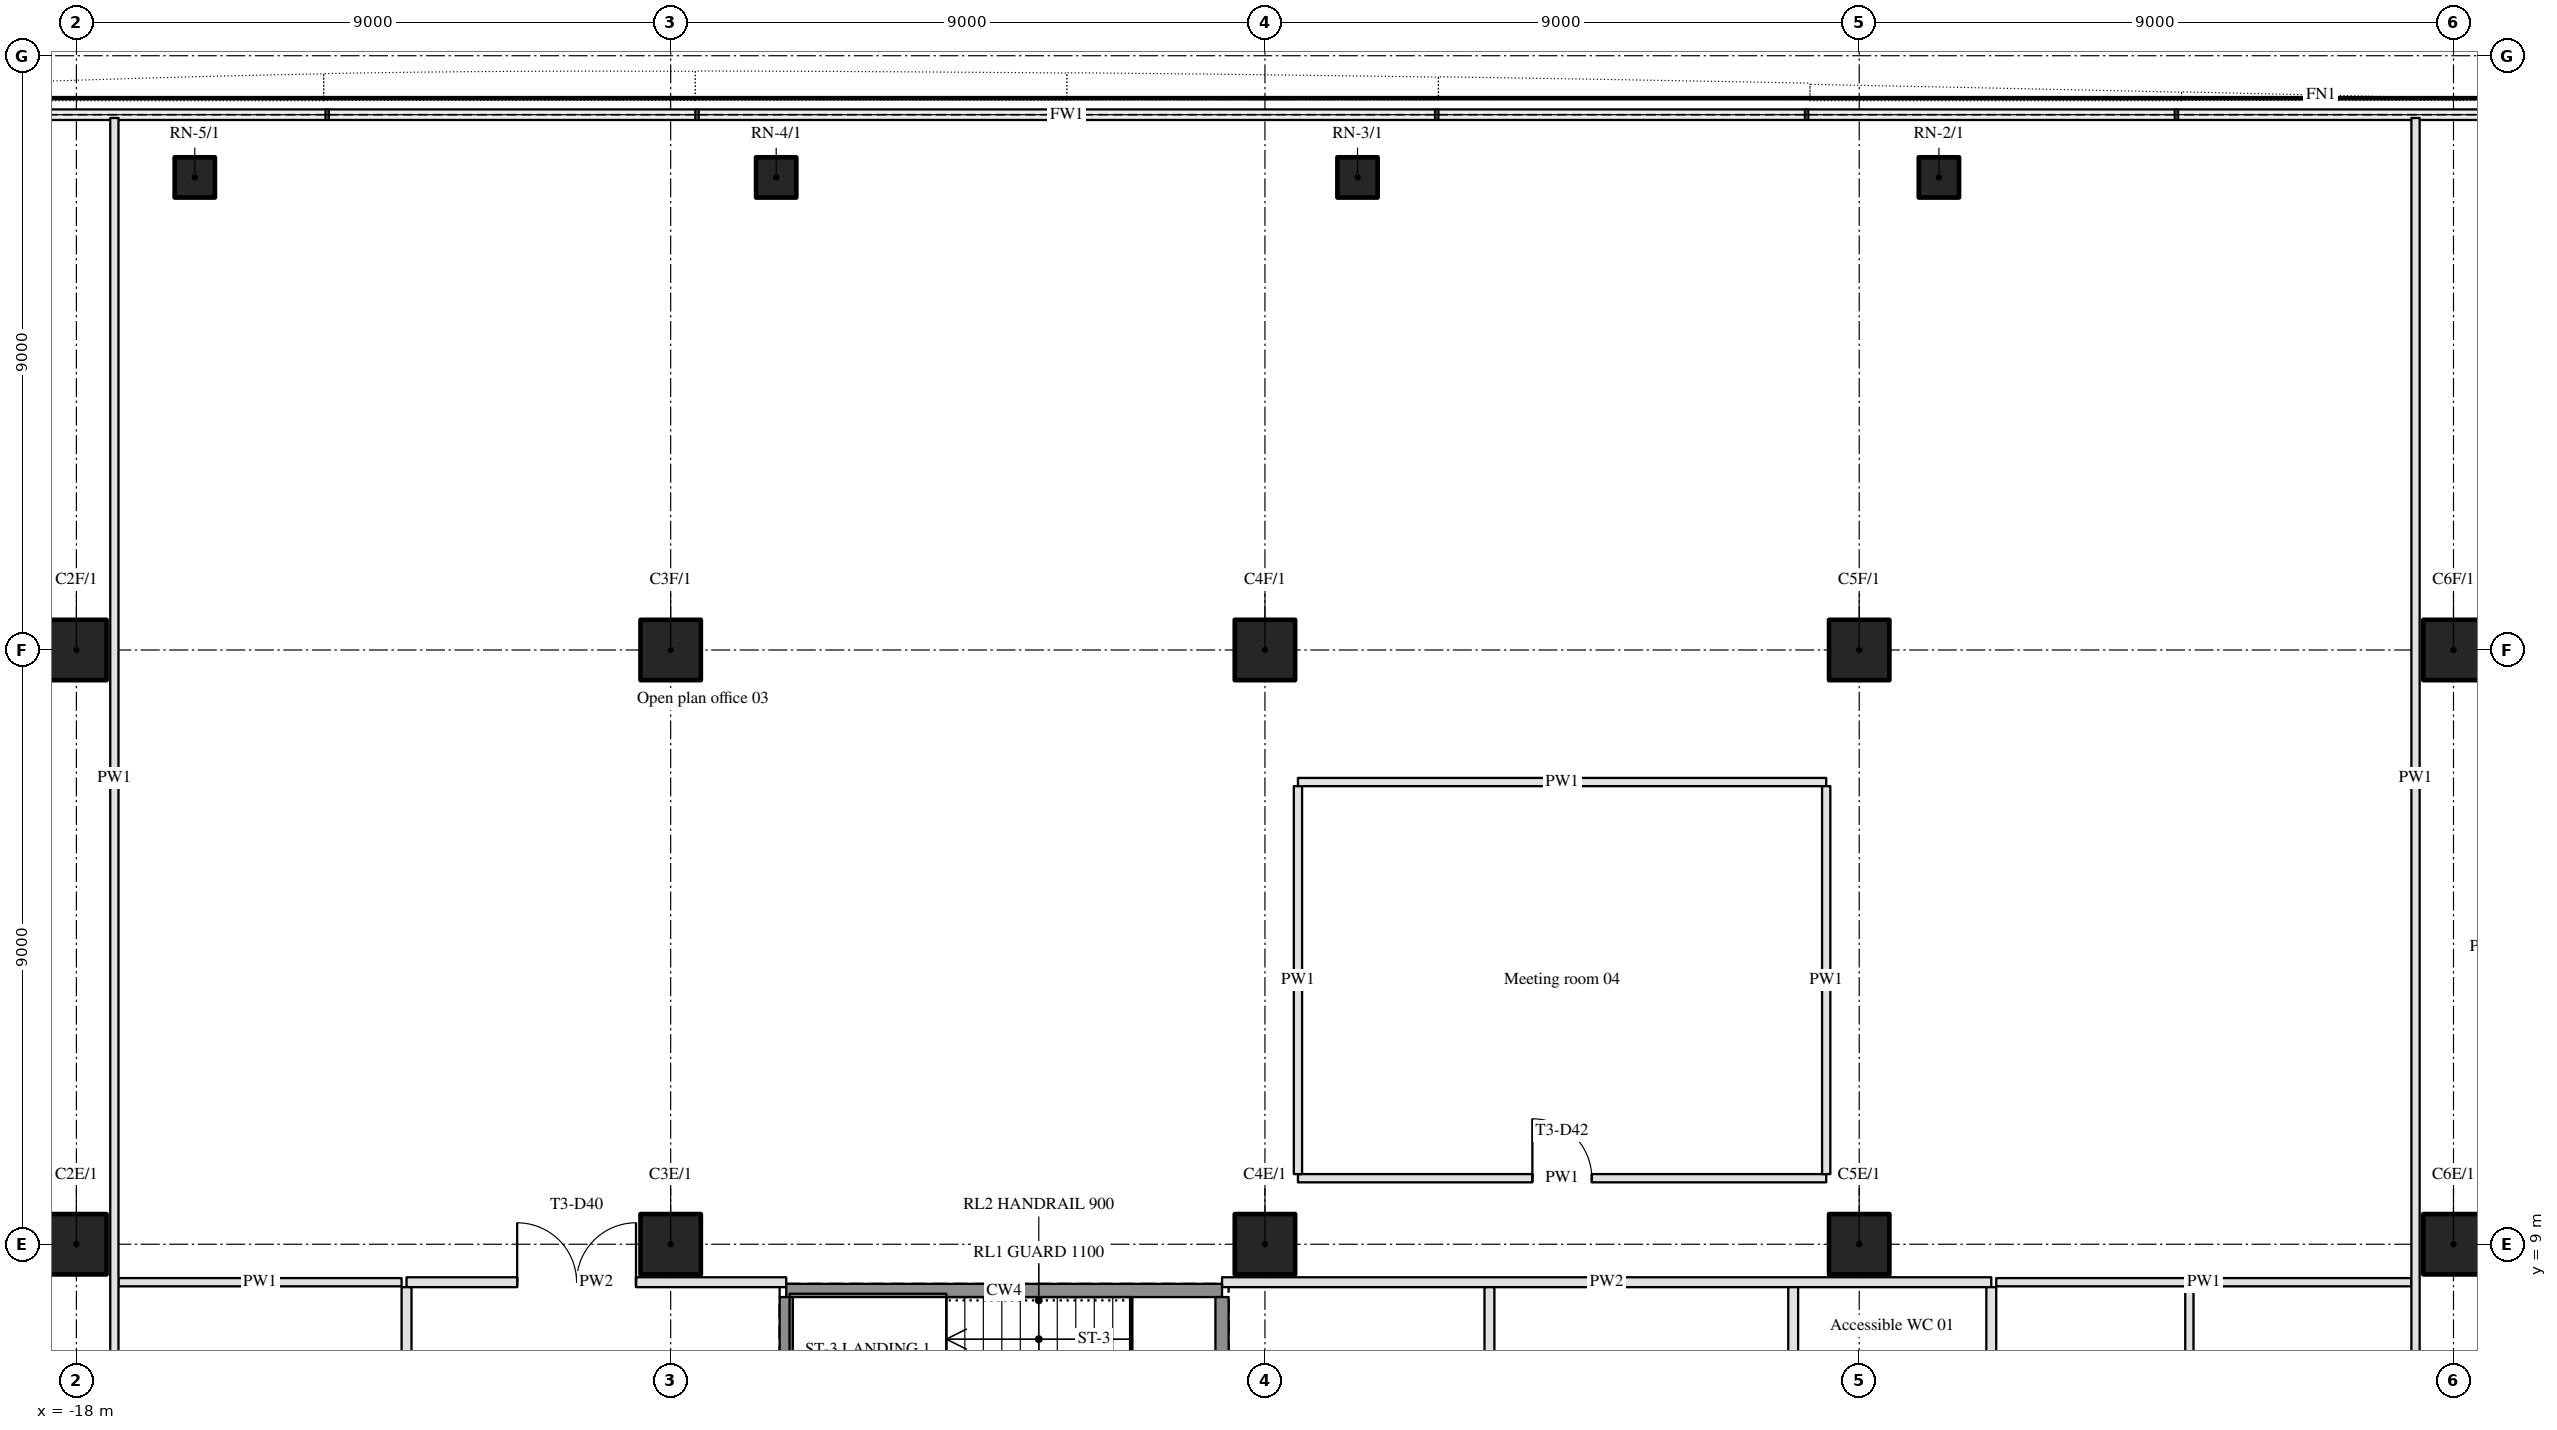
"""IFC4 building model, lengths in metres.
Left out: names, types, materials, properties, quantities, classifications, styles, units other than length and angle.
Written with IfcOpenShell. Run it as: python <this file> out.ifc"""

import sys

from ifc_helpers import new_model, si_unit, direction, frame, frame_2d, origin, origin_2d, place, context, subcontext, project, spatial, rectangle, hollow_circle, extrude, element, fill, save


model = new_model("IFC4")
c1 = context("Model", 3, precision=1e-05, world=origin(), true_north=direction((0.0, 1.0)))
c2 = subcontext(c1, "Body", "Model", "MODEL_VIEW")
j1 = project(units=[si_unit("LENGTHUNIT", "METRE"), si_unit("PLANEANGLEUNIT", "RADIAN")], contexts=[c1])
p1 = place(None, origin())
s1 = spatial("IfcSite", under=j1, at=p1, CompositionType="ELEMENT")
p2 = place(p1, origin())
s2 = spatial("IfcBuilding", under=s1, at=p2, CompositionType="ELEMENT")
p3 = place(p2, frame((0.0, 0.0, 53.7)))
s3 = spatial("IfcBuildingStorey", under=s2, at=p3, CompositionType="ELEMENT", Elevation=53.7)
for number, where, z_axis, x_axis in (
    (1, (-18.0, 9.0, 0.0), (0.0, 0.0, 1.0), (1.0, 0.0, 0.0)),
    (2, (-18.0, 18.0, 0.0), (0.0, 0.0, 1.0), (1.0, 0.0, 0.0)),
    (3, (-9.0, 9.0, 0.0), (0.0, 0.0, 1.0), (1.0, 0.0, 0.0)),
    (4, (-9.0, 18.0, 0.0), (0.0, 0.0, 1.0), (1.0, 0.0, 0.0)),
    (5, (0.0, 9.0, 0.0), (0.0, 0.0, 1.0), (1.0, 0.0, 0.0)),
    (6, (0.0, 18.0, 0.0), (0.0, 0.0, 1.0), (1.0, 0.0, 0.0)),
    (7, (9.0, 9.0, 0.0), (0.0, 0.0, 1.0), (1.0, 0.0, 0.0)),
    (8, (9.0, 18.0, 0.0), (0.0, 0.0, 1.0), (1.0, 0.0, 0.0)),
    (9, (18.0, 9.0, 0.0), (0.0, 0.0, 1.0), (1.0, 0.0, 0.0)),
    (10, (18.0, 18.0, 0.0), (0.0, 0.0, 1.0), (1.0, 0.0, 0.0)),
):
    element("IfcColumn", number, at=place(p3, frame(where, z_axis=z_axis, x_axis=x_axis)), inside=s3, PredefinedType="COLUMN", context=c2, shape_type="SweptSolid", body=[
        extrude(hollow_circle(Radius=0.457, WallThickness=0.05, at=origin_2d()), origin(), (0.0, 0.0, 1.0), 3.9),
    ])
for number, where, z_axis, x_axis in (
    (11, (10.207, 25.157, 0.0), (0.0, 0.0, 1.0), (1.0, 0.0, 0.0)),
    (12, (1.402, 25.157, 0.0), (0.0, 0.0, 1.0), (1.0, 0.0, 0.0)),
    (13, (-7.402, 25.157, 0.0), (0.0, 0.0, 1.0), (1.0, 0.0, 0.0)),
    (14, (-16.207, 25.157, 0.0), (0.0, 0.0, 1.0), (1.0, 0.0, 0.0)),
):
    element("IfcColumn", number, at=place(p3, frame(where, z_axis=z_axis, x_axis=x_axis)), inside=s3, PredefinedType="COLUMN", context=c2, shape_type="SweptSolid", body=[
        extrude(hollow_circle(Radius=0.305, WallThickness=0.03, at=origin_2d()), origin(), (0.0, 0.0, 1.0), 3.9),
    ])
p4 = place(p3, frame((-7.25, 8.3, 0.0), z_axis=(0.0, 0.0, 1.0), x_axis=(1.0, 0.0, 0.0)))
e15 = element("IfcWall", 15, at=p4, inside=s3, PredefinedType="SHEAR", context=c2, shape_type="SweptSolid", body=[
    extrude(rectangle(XDim=6.6, YDim=0.2, at=frame_2d((3.3, 0.0))), origin(), (0.0, 0.0, 1.0), 3.9),
])
p5 = place(p3, frame((-17.363, 8.425, 0.0), z_axis=(0.0, 0.0, 1.0), x_axis=(1.0, 0.0, 0.0)))
e16 = element("IfcWall", 16, at=p5, inside=s3, PredefinedType="PARTITIONING", context=c2, shape_type="SweptSolid", body=[
    extrude(rectangle(XDim=4.288, YDim=0.125, at=frame_2d((2.144, 0.0))), origin(), (0.0, 0.0, 1.0), 2.96),
])
p6 = place(p3, frame((-13.0, 8.425, 0.0), z_axis=(0.0, 0.0, 1.0), x_axis=(1.0, 0.0, 0.0)))
e17 = element("IfcWall", 17, at=p6, inside=s3, PredefinedType="PARTITIONING", context=c2, shape_type="SweptSolid", body=[
    extrude(rectangle(XDim=5.75, YDim=0.15, at=frame_2d((2.875, 0.0))), origin(), (0.0, 0.0, 1.0), 2.96),
])
p7 = place(p6, frame((1.675, 0.0, 0.0)))
e18 = element("IfcOpeningElement", 18, at=p7, cuts=e17, PredefinedType="OPENING", context=c2, shape_type="SweptSolid", body=[
    extrude(rectangle(XDim=1.8, YDim=2.1, at=frame_2d((0.9, 1.05))), frame((0.0, 0.085, 0.0), z_axis=(0.0, -1.0, 0.0), x_axis=(1.0, 0.0, 0.0)), (0.0, 0.0, 1.0), 0.17),
])
p8 = place(p3, frame((-0.65, 8.425, 0.0), z_axis=(0.0, 0.0, 1.0), x_axis=(1.0, 0.0, 0.0)))
e19 = element("IfcWall", 19, at=p8, inside=s3, PredefinedType="PARTITIONING", context=c2, shape_type="SweptSolid", body=[
    extrude(rectangle(XDim=11.65, YDim=0.15, at=frame_2d((5.825, 0.0))), origin(), (0.0, 0.0, 1.0), 2.96),
])
p9 = place(p3, frame((11.075, 8.425, 0.0), z_axis=(0.0, 0.0, 1.0), x_axis=(1.0, 0.0, 0.0)))
e20 = element("IfcWall", 20, at=p9, inside=s3, PredefinedType="PARTITIONING", context=c2, shape_type="SweptSolid", body=[
    extrude(rectangle(XDim=6.288, YDim=0.125, at=frame_2d((3.144, 0.0))), origin(), (0.0, 0.0, 1.0), 2.96),
])
p10 = place(p3, frame((0.5, 10.0, 0.0), z_axis=(0.0, 0.0, 1.0), x_axis=(1.0, 0.0, 0.0)))
e21 = element("IfcWall", 21, at=p10, inside=s3, PredefinedType="PARTITIONING", context=c2, shape_type="SweptSolid", body=[
    extrude(rectangle(XDim=8.0, YDim=0.125, at=frame_2d((4.0, 0.0))), origin(), (0.0, 0.0, 1.0), 2.96),
])
p11 = place(p10, frame((3.55, 0.0, 0.0)))
e22 = element("IfcOpeningElement", 22, at=p11, cuts=e21, PredefinedType="OPENING", context=c2, shape_type="SweptSolid", body=[
    extrude(rectangle(XDim=0.9, YDim=2.1, at=frame_2d((0.45, 1.05))), frame((0.0, 0.073, 0.0), z_axis=(0.0, -1.0, 0.0), x_axis=(1.0, 0.0, 0.0)), (0.0, 0.0, 1.0), 0.145),
])
p12 = place(p3, frame((0.5, 16.0, 0.0), z_axis=(0.0, 0.0, 1.0), x_axis=(1.0, 0.0, 0.0)))
e23 = element("IfcWall", 23, at=p12, inside=s3, PredefinedType="PARTITIONING", context=c2, shape_type="SweptSolid", body=[
    extrude(rectangle(XDim=8.0, YDim=0.125, at=frame_2d((4.0, 0.0))), origin(), (0.0, 0.0, 1.0), 2.96),
])
p13 = place(p3, frame((-17.425, 6.075, 0.0), z_axis=(0.0, 0.0, 1.0), x_axis=(0.0, 1.0, 0.0)))
e24 = element("IfcWall", 24, at=p13, inside=s3, PredefinedType="PARTITIONING", context=c2, shape_type="SweptSolid", body=[
    extrude(rectangle(XDim=19.982, YDim=0.125, at=frame_2d((9.991, 0.0))), origin(), (0.0, 0.0, 1.0), 2.96),
])
p14 = place(p3, frame((-13.0, 6.075, 0.0), z_axis=(0.0, 0.0, 1.0), x_axis=(0.0, 1.0, 0.0)))
e25 = element("IfcWall", 25, at=p14, inside=s3, PredefinedType="PARTITIONING", context=c2, shape_type="SweptSolid", body=[
    extrude(rectangle(XDim=2.275, YDim=0.15, at=frame_2d((1.138, 0.0))), origin(), (0.0, 0.0, 1.0), 2.96),
])
for number, where, z_axis, x_axis in (
    (26, (-7.25, 5.5, 0.0), (0.0, 0.0, 1.0), (0.0, 1.0, 0.0)),
    (27, (-0.65, 5.5, 0.0), (0.0, 0.0, 1.0), (0.0, 1.0, 0.0)),
):
    element("IfcWall", number, at=place(p3, frame(where, z_axis=z_axis, x_axis=x_axis)), inside=s3, PredefinedType="SHEAR", context=c2, shape_type="SweptSolid", body=[
        extrude(rectangle(XDim=2.7, YDim=0.2, at=frame_2d((1.35, 0.0))), origin(), (0.0, 0.0, 1.0), 3.9),
    ])
p15 = place(p3, frame((0.5, 10.062, 0.0), z_axis=(0.0, 0.0, 1.0), x_axis=(0.0, 1.0, 0.0)))
e28 = element("IfcWall", 28, at=p15, inside=s3, PredefinedType="PARTITIONING", context=c2, shape_type="SweptSolid", body=[
    extrude(rectangle(XDim=5.875, YDim=0.125, at=frame_2d((2.938, 0.0))), origin(), (0.0, 0.0, 1.0), 2.96),
])
for number, where, z_axis, x_axis in (
    (29, (3.4, 6.075, 0.0), (0.0, 0.0, 1.0), (0.0, 1.0, 0.0)),
    (30, (8.0, 6.075, 0.0), (0.0, 0.0, 1.0), (0.0, 1.0, 0.0)),
):
    element("IfcWall", number, at=place(p3, frame(where, z_axis=z_axis, x_axis=x_axis)), inside=s3, PredefinedType="PARTITIONING", context=c2, shape_type="SweptSolid", body=[
        extrude(rectangle(XDim=2.275, YDim=0.15, at=frame_2d((1.138, 0.0))), origin(), (0.0, 0.0, 1.0), 2.96),
    ])
p16 = place(p3, frame((8.5, 10.062, 0.0), z_axis=(0.0, 0.0, 1.0), x_axis=(0.0, 1.0, 0.0)))
e31 = element("IfcWall", 31, at=p16, inside=s3, PredefinedType="PARTITIONING", context=c2, shape_type="SweptSolid", body=[
    extrude(rectangle(XDim=5.875, YDim=0.125, at=frame_2d((2.938, 0.0))), origin(), (0.0, 0.0, 1.0), 2.96),
])
p17 = place(p3, frame((11.0, 6.075, 0.0), z_axis=(0.0, 0.0, 1.0), x_axis=(0.0, 1.0, 0.0)))
e32 = element("IfcWall", 32, at=p17, inside=s3, PredefinedType="PARTITIONING", context=c2, shape_type="SweptSolid", body=[
    extrude(rectangle(XDim=2.275, YDim=0.15, at=frame_2d((1.138, 0.0))), origin(), (0.0, 0.0, 1.0), 2.96),
])
p18 = place(p3, frame((14.0, 6.075, 0.0), z_axis=(0.0, 0.0, 1.0), x_axis=(0.0, 1.0, 0.0)))
e33 = element("IfcWall", 33, at=p18, inside=s3, PredefinedType="PARTITIONING", context=c2, shape_type="SweptSolid", body=[
    extrude(rectangle(XDim=2.288, YDim=0.125, at=frame_2d((1.144, 0.0))), origin(), (0.0, 0.0, 1.0), 2.96),
])
p19 = place(p3, frame((17.425, 6.075, 0.0), z_axis=(0.0, 0.0, 1.0), x_axis=(0.0, 1.0, 0.0)))
e34 = element("IfcWall", 34, at=p19, inside=s3, PredefinedType="PARTITIONING", context=c2, shape_type="SweptSolid", body=[
    extrude(rectangle(XDim=19.982, YDim=0.125, at=frame_2d((9.991, 0.0))), origin(), (0.0, 0.0, 1.0), 2.96),
])
p20 = place(p7, origin())
e35 = element("IfcDoor", 35, at=p20, inside=s3, OperationType="DOUBLE_DOOR_SINGLE_SWING", PredefinedType="DOOR", context=c2, shape_type="SweptSolid", body=[
    extrude(rectangle(XDim=1.8, YDim=2.1, at=frame_2d((0.9, 1.05))), frame((0.0, 0.025, 0.0), z_axis=(0.0, -1.0, 0.0), x_axis=(1.0, 0.0, 0.0)), (0.0, 0.0, 1.0), 0.05),
])
fill(e18, e35)
p21 = place(p11, origin())
e36 = element("IfcDoor", 36, at=p21, inside=s3, OperationType="SINGLE_SWING_LEFT", PredefinedType="DOOR", context=c2, shape_type="SweptSolid", body=[
    extrude(rectangle(XDim=0.9, YDim=2.1, at=frame_2d((0.45, 1.05))), frame((0.0, 0.025, 0.0), z_axis=(0.0, -1.0, 0.0), x_axis=(1.0, 0.0, 0.0)), (0.0, 0.0, 1.0), 0.05),
])
fill(e22, e36)
save(model, sys.argv[1])
